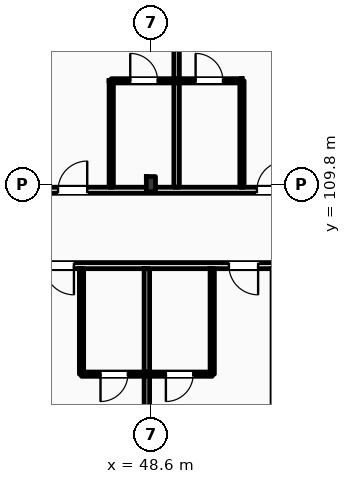
"""IFC4 building model, lengths in metres.
Left out: names, types, materials, properties, quantities, classifications, styles, units other than length and angle.
Written with IfcOpenShell. Run it as: python <this file> out.ifc"""

import sys

from ifc_helpers import new_model, si_unit, direction, frame, frame_2d, origin, origin_2d, place, context, subcontext, project, spatial, rectangle, i_section, extrude, element, fill, save


model = new_model("IFC4")
c1 = context("Model", 3, precision=1e-05, world=origin(), true_north=direction((0.0, 1.0)))
c2 = subcontext(c1, "Body", "Model", "MODEL_VIEW")
j1 = project(units=[si_unit("LENGTHUNIT", "METRE"), si_unit("PLANEANGLEUNIT", "RADIAN")], contexts=[c1])
p1 = place(None, origin())
s1 = spatial("IfcSite", under=j1, at=p1, CompositionType="ELEMENT")
p2 = place(p1, origin())
s2 = spatial("IfcBuilding", under=s1, at=p2, CompositionType="ELEMENT")
p3 = place(p2, frame((0.0, 0.0, 28.2)))
s3 = spatial("IfcBuildingStorey", under=s2, at=p3, CompositionType="ELEMENT", Elevation=28.2)
p4 = place(p3, frame((48.6, 109.8, 0.0), z_axis=(0.0, 0.0, 1.0), x_axis=(1.0, 0.0, 0.0)))
e1 = element("IfcColumn", 1, at=p4, inside=s3, PredefinedType="COLUMN", context=c2, shape_type="SweptSolid", body=[
    extrude(i_section(OverallWidth=0.3, OverallDepth=0.5, WebThickness=0.014, FlangeThickness=0.028, FilletRadius=0.027, at=origin_2d()), origin(), (0.0, 0.0, 1.0), 3.6),
])
p5 = place(p3, frame((10.65, 109.6, 0.0), z_axis=(0.0, 0.0, 1.0), x_axis=(1.0, 0.0, 0.0)))
e2 = element("IfcWall", 2, at=p5, inside=s3, PredefinedType="PARTITIONING", context=c2, shape_type="SweptSolid", body=[
    extrude(rectangle(XDim=109.21, YDim=0.2, at=frame_2d((54.605, 0.0))), origin(), (0.0, 0.0, 1.0), 2.8),
])
p6 = place(p5, frame((12.611, 0.0, 0.0)))
e3 = element("IfcOpeningElement", 3, at=p6, cuts=e2, PredefinedType="OPENING", context=c2, shape_type="SweptSolid", body=[
    extrude(rectangle(XDim=1.02, YDim=2.2, at=frame_2d((0.51, 1.1))), frame((0.0, 0.11, 0.0), z_axis=(0.0, -1.0, 0.0), x_axis=(1.0, 0.0, 0.0)), (0.0, 0.0, 1.0), 0.22),
])
p7 = place(p5, frame((19.451, 0.0, 0.0)))
e4 = element("IfcOpeningElement", 4, at=p7, cuts=e2, PredefinedType="OPENING", context=c2, shape_type="SweptSolid", body=[
    extrude(rectangle(XDim=1.02, YDim=2.2, at=frame_2d((0.51, 1.1))), frame((0.0, 0.11, 0.0), z_axis=(0.0, -1.0, 0.0), x_axis=(1.0, 0.0, 0.0)), (0.0, 0.0, 1.0), 0.22),
])
p8 = place(p5, frame((23.842, 0.0, 0.0)))
e5 = element("IfcOpeningElement", 5, at=p8, cuts=e2, PredefinedType="OPENING", context=c2, shape_type="SweptSolid", body=[
    extrude(rectangle(XDim=1.02, YDim=2.2, at=frame_2d((0.51, 1.1))), frame((0.0, 0.11, 0.0), z_axis=(0.0, -1.0, 0.0), x_axis=(1.0, 0.0, 0.0)), (0.0, 0.0, 1.0), 0.22),
])
p9 = place(p5, frame((26.084, 0.0, 0.0)))
e6 = element("IfcOpeningElement", 6, at=p9, cuts=e2, PredefinedType="OPENING", context=c2, shape_type="SweptSolid", body=[
    extrude(rectangle(XDim=1.02, YDim=2.2, at=frame_2d((0.51, 1.1))), frame((0.0, 0.11, 0.0), z_axis=(0.0, -1.0, 0.0), x_axis=(1.0, 0.0, 0.0)), (0.0, 0.0, 1.0), 0.22),
])
p10 = place(p5, frame((32.655, 0.0, 0.0)))
e7 = element("IfcOpeningElement", 7, at=p10, cuts=e2, PredefinedType="OPENING", context=c2, shape_type="SweptSolid", body=[
    extrude(rectangle(XDim=0.96, YDim=2.2, at=frame_2d((0.48, 1.1))), frame((0.0, 0.11, 0.0), z_axis=(0.0, -1.0, 0.0), x_axis=(1.0, 0.0, 0.0)), (0.0, 0.0, 1.0), 0.22),
])
p11 = place(p5, frame((34.895, 0.0, 0.0)))
e8 = element("IfcOpeningElement", 8, at=p11, cuts=e2, PredefinedType="OPENING", context=c2, shape_type="SweptSolid", body=[
    extrude(rectangle(XDim=0.96, YDim=2.2, at=frame_2d((0.48, 1.1))), frame((0.0, 0.11, 0.0), z_axis=(0.0, -1.0, 0.0), x_axis=(1.0, 0.0, 0.0)), (0.0, 0.0, 1.0), 0.22),
])
p12 = place(p5, frame((41.436, 0.0, 0.0)))
e9 = element("IfcOpeningElement", 9, at=p12, cuts=e2, PredefinedType="OPENING", context=c2, shape_type="SweptSolid", body=[
    extrude(rectangle(XDim=0.96, YDim=2.2, at=frame_2d((0.48, 1.1))), frame((0.0, 0.11, 0.0), z_axis=(0.0, -1.0, 0.0), x_axis=(1.0, 0.0, 0.0)), (0.0, 0.0, 1.0), 0.22),
])
p13 = place(p5, frame((43.427, 0.0, 0.0)))
e10 = element("IfcOpeningElement", 10, at=p13, cuts=e2, PredefinedType="OPENING", context=c2, shape_type="SweptSolid", body=[
    extrude(rectangle(XDim=0.96, YDim=2.2, at=frame_2d((0.48, 1.1))), frame((0.0, 0.11, 0.0), z_axis=(0.0, -1.0, 0.0), x_axis=(1.0, 0.0, 0.0)), (0.0, 0.0, 1.0), 0.22),
])
p14 = place(p5, frame((50.218, 0.0, 0.0)))
e11 = element("IfcOpeningElement", 11, at=p14, cuts=e2, PredefinedType="OPENING", context=c2, shape_type="SweptSolid", body=[
    extrude(rectangle(XDim=0.96, YDim=2.2, at=frame_2d((0.48, 1.1))), frame((0.0, 0.11, 0.0), z_axis=(0.0, -1.0, 0.0), x_axis=(1.0, 0.0, 0.0)), (0.0, 0.0, 1.0), 0.22),
])
p15 = place(p5, frame((54.859, 0.0, 0.0)))
e12 = element("IfcOpeningElement", 12, at=p15, cuts=e2, PredefinedType="OPENING", context=c2, shape_type="SweptSolid", body=[
    extrude(rectangle(XDim=0.96, YDim=2.2, at=frame_2d((0.48, 1.1))), frame((0.0, 0.11, 0.0), z_axis=(0.0, -1.0, 0.0), x_axis=(1.0, 0.0, 0.0)), (0.0, 0.0, 1.0), 0.22),
])
p16 = place(p5, frame((59.0, 0.0, 0.0)))
e13 = element("IfcOpeningElement", 13, at=p16, cuts=e2, PredefinedType="OPENING", context=c2, shape_type="SweptSolid", body=[
    extrude(rectangle(XDim=0.96, YDim=2.2, at=frame_2d((0.48, 1.1))), frame((0.0, 0.11, 0.0), z_axis=(0.0, -1.0, 0.0), x_axis=(1.0, 0.0, 0.0)), (0.0, 0.0, 1.0), 0.22),
])
p17 = place(p5, frame((63.39, 0.0, 0.0)))
e14 = element("IfcOpeningElement", 14, at=p17, cuts=e2, PredefinedType="OPENING", context=c2, shape_type="SweptSolid", body=[
    extrude(rectangle(XDim=0.96, YDim=2.2, at=frame_2d((0.48, 1.1))), frame((0.0, 0.11, 0.0), z_axis=(0.0, -1.0, 0.0), x_axis=(1.0, 0.0, 0.0)), (0.0, 0.0, 1.0), 0.22),
])
p18 = place(p5, frame((65.631, 0.0, 0.0)))
e15 = element("IfcOpeningElement", 15, at=p18, cuts=e2, PredefinedType="OPENING", context=c2, shape_type="SweptSolid", body=[
    extrude(rectangle(XDim=0.96, YDim=2.2, at=frame_2d((0.48, 1.1))), frame((0.0, 0.11, 0.0), z_axis=(0.0, -1.0, 0.0), x_axis=(1.0, 0.0, 0.0)), (0.0, 0.0, 1.0), 0.22),
])
p19 = place(p5, frame((72.172, 0.0, 0.0)))
e16 = element("IfcOpeningElement", 16, at=p19, cuts=e2, PredefinedType="OPENING", context=c2, shape_type="SweptSolid", body=[
    extrude(rectangle(XDim=0.96, YDim=2.2, at=frame_2d((0.48, 1.1))), frame((0.0, 0.11, 0.0), z_axis=(0.0, -1.0, 0.0), x_axis=(1.0, 0.0, 0.0)), (0.0, 0.0, 1.0), 0.22),
])
p20 = place(p5, frame((74.413, 0.0, 0.0)))
e17 = element("IfcOpeningElement", 17, at=p20, cuts=e2, PredefinedType="OPENING", context=c2, shape_type="SweptSolid", body=[
    extrude(rectangle(XDim=0.96, YDim=2.2, at=frame_2d((0.48, 1.1))), frame((0.0, 0.11, 0.0), z_axis=(0.0, -1.0, 0.0), x_axis=(1.0, 0.0, 0.0)), (0.0, 0.0, 1.0), 0.22),
])
p21 = place(p5, frame((80.954, 0.0, 0.0)))
e18 = element("IfcOpeningElement", 18, at=p21, cuts=e2, PredefinedType="OPENING", context=c2, shape_type="SweptSolid", body=[
    extrude(rectangle(XDim=0.96, YDim=2.2, at=frame_2d((0.48, 1.1))), frame((0.0, 0.11, 0.0), z_axis=(0.0, -1.0, 0.0), x_axis=(1.0, 0.0, 0.0)), (0.0, 0.0, 1.0), 0.22),
])
p22 = place(p5, frame((83.195, 0.0, 0.0)))
e19 = element("IfcOpeningElement", 19, at=p22, cuts=e2, PredefinedType="OPENING", context=c2, shape_type="SweptSolid", body=[
    extrude(rectangle(XDim=0.96, YDim=2.2, at=frame_2d((0.48, 1.1))), frame((0.0, 0.11, 0.0), z_axis=(0.0, -1.0, 0.0), x_axis=(1.0, 0.0, 0.0)), (0.0, 0.0, 1.0), 0.22),
])
p23 = place(p5, frame((89.735, 0.0, 0.0)))
e20 = element("IfcOpeningElement", 20, at=p23, cuts=e2, PredefinedType="OPENING", context=c2, shape_type="SweptSolid", body=[
    extrude(rectangle(XDim=0.96, YDim=2.2, at=frame_2d((0.48, 1.1))), frame((0.0, 0.11, 0.0), z_axis=(0.0, -1.0, 0.0), x_axis=(1.0, 0.0, 0.0)), (0.0, 0.0, 1.0), 0.22),
])
p24 = place(p5, frame((94.126, 0.0, 0.0)))
e21 = element("IfcOpeningElement", 21, at=p24, cuts=e2, PredefinedType="OPENING", context=c2, shape_type="SweptSolid", body=[
    extrude(rectangle(XDim=0.96, YDim=2.2, at=frame_2d((0.48, 1.1))), frame((0.0, 0.11, 0.0), z_axis=(0.0, -1.0, 0.0), x_axis=(1.0, 0.0, 0.0)), (0.0, 0.0, 1.0), 0.22),
])
p25 = place(p5, frame((98.517, 0.0, 0.0)))
e22 = element("IfcOpeningElement", 22, at=p25, cuts=e2, PredefinedType="OPENING", context=c2, shape_type="SweptSolid", body=[
    extrude(rectangle(XDim=0.96, YDim=2.2, at=frame_2d((0.48, 1.1))), frame((0.0, 0.11, 0.0), z_axis=(0.0, -1.0, 0.0), x_axis=(1.0, 0.0, 0.0)), (0.0, 0.0, 1.0), 0.22),
])
p26 = place(p5, frame((102.908, 0.0, 0.0)))
e23 = element("IfcOpeningElement", 23, at=p26, cuts=e2, PredefinedType="OPENING", context=c2, shape_type="SweptSolid", body=[
    extrude(rectangle(XDim=0.96, YDim=2.2, at=frame_2d((0.48, 1.1))), frame((0.0, 0.11, 0.0), z_axis=(0.0, -1.0, 0.0), x_axis=(1.0, 0.0, 0.0)), (0.0, 0.0, 1.0), 0.22),
])
p27 = place(p5, frame((105.099, 0.0, 0.0)))
e24 = element("IfcOpeningElement", 24, at=p27, cuts=e2, PredefinedType="OPENING", context=c2, shape_type="SweptSolid", body=[
    extrude(rectangle(XDim=0.96, YDim=2.2, at=frame_2d((0.48, 1.1))), frame((0.0, 0.11, 0.0), z_axis=(0.0, -1.0, 0.0), x_axis=(1.0, 0.0, 0.0)), (0.0, 0.0, 1.0), 0.22),
])
p28 = place(p5, frame((2.716, 0.0, 0.0)))
e25 = element("IfcOpeningElement", 25, at=p28, cuts=e2, PredefinedType="OPENING", context=c2, shape_type="SweptSolid", body=[
    extrude(rectangle(XDim=1.35, YDim=2.25, at=frame_2d((0.675, 1.125))), frame((0.0, 0.11, 0.0), z_axis=(0.0, -1.0, 0.0), x_axis=(1.0, 0.0, 0.0)), (0.0, 0.0, 1.0), 0.22),
])
p29 = place(p5, frame((6.65, 0.0, 0.0)))
e26 = element("IfcOpeningElement", 26, at=p29, cuts=e2, PredefinedType="OPENING", context=c2, shape_type="SweptSolid", body=[
    extrude(rectangle(XDim=1.35, YDim=2.25, at=frame_2d((0.675, 1.125))), frame((0.0, 0.11, 0.0), z_axis=(0.0, -1.0, 0.0), x_axis=(1.0, 0.0, 0.0)), (0.0, 0.0, 1.0), 0.22),
])
p30 = place(p5, frame((10.583, 0.0, 0.0)))
e27 = element("IfcOpeningElement", 27, at=p30, cuts=e2, PredefinedType="OPENING", context=c2, shape_type="SweptSolid", body=[
    extrude(rectangle(XDim=1.35, YDim=2.25, at=frame_2d((0.675, 1.125))), frame((0.0, 0.11, 0.0), z_axis=(0.0, -1.0, 0.0), x_axis=(1.0, 0.0, 0.0)), (0.0, 0.0, 1.0), 0.22),
])
p31 = place(p3, frame((40.76, 107.12, 0.0), z_axis=(0.0, 0.0, 1.0), x_axis=(1.0, 0.0, 0.0)))
e28 = element("IfcWall", 28, at=p31, inside=s3, PredefinedType="PARTITIONING", context=c2, shape_type="SweptSolid", body=[
    extrude(rectangle(XDim=23.44, YDim=0.2, at=frame_2d((11.72, 0.0))), origin(), (0.0, 0.0, 1.0), 3.36),
])
p32 = place(p31, frame((2.639, 0.0, 0.0)))
e29 = element("IfcOpeningElement", 29, at=p32, cuts=e28, PredefinedType="OPENING", context=c2, shape_type="SweptSolid", body=[
    extrude(rectangle(XDim=0.96, YDim=2.2, at=frame_2d((0.48, 1.1))), frame((0.0, 0.11, 0.0), z_axis=(0.0, -1.0, 0.0), x_axis=(1.0, 0.0, 0.0)), (0.0, 0.0, 1.0), 0.22),
])
p33 = place(p31, frame((4.348, 0.0, 0.0)))
e30 = element("IfcOpeningElement", 30, at=p33, cuts=e28, PredefinedType="OPENING", context=c2, shape_type="SweptSolid", body=[
    extrude(rectangle(XDim=0.96, YDim=2.2, at=frame_2d((0.48, 1.1))), frame((0.0, 0.11, 0.0), z_axis=(0.0, -1.0, 0.0), x_axis=(1.0, 0.0, 0.0)), (0.0, 0.0, 1.0), 0.22),
])
p34 = place(p31, frame((10.406, 0.0, 0.0)))
e31 = element("IfcOpeningElement", 31, at=p34, cuts=e28, PredefinedType="OPENING", context=c2, shape_type="SweptSolid", body=[
    extrude(rectangle(XDim=0.96, YDim=2.2, at=frame_2d((0.48, 1.1))), frame((0.0, 0.11, 0.0), z_axis=(0.0, -1.0, 0.0), x_axis=(1.0, 0.0, 0.0)), (0.0, 0.0, 1.0), 0.22),
])
p35 = place(p31, frame((12.164, 0.0, 0.0)))
e32 = element("IfcOpeningElement", 32, at=p35, cuts=e28, PredefinedType="OPENING", context=c2, shape_type="SweptSolid", body=[
    extrude(rectangle(XDim=0.96, YDim=2.2, at=frame_2d((0.48, 1.1))), frame((0.0, 0.11, 0.0), z_axis=(0.0, -1.0, 0.0), x_axis=(1.0, 0.0, 0.0)), (0.0, 0.0, 1.0), 0.22),
])
p36 = place(p31, frame((18.223, 0.0, 0.0)))
e33 = element("IfcOpeningElement", 33, at=p36, cuts=e28, PredefinedType="OPENING", context=c2, shape_type="SweptSolid", body=[
    extrude(rectangle(XDim=0.96, YDim=2.2, at=frame_2d((0.48, 1.1))), frame((0.0, 0.11, 0.0), z_axis=(0.0, -1.0, 0.0), x_axis=(1.0, 0.0, 0.0)), (0.0, 0.0, 1.0), 0.22),
])
p37 = place(p31, frame((20.031, 0.0, 0.0)))
e34 = element("IfcOpeningElement", 34, at=p37, cuts=e28, PredefinedType="OPENING", context=c2, shape_type="SweptSolid", body=[
    extrude(rectangle(XDim=0.96, YDim=2.2, at=frame_2d((0.48, 1.1))), frame((0.0, 0.11, 0.0), z_axis=(0.0, -1.0, 0.0), x_axis=(1.0, 0.0, 0.0)), (0.0, 0.0, 1.0), 0.22),
])
p38 = place(p3, frame((49.445, 109.7, 0.0), z_axis=(0.0, 0.0, 1.0), x_axis=(0.0, 1.0, 0.0)))
e35 = element("IfcWall", 35, at=p38, inside=s3, PredefinedType="PARTITIONING", context=c2, shape_type="SweptSolid", body=[
    extrude(rectangle(XDim=8.15, YDim=0.18, at=frame_2d((4.075, 0.0))), origin(), (0.0, 0.0, 1.0), 3.36),
])
p39 = place(p3, frame((47.295, 109.7, 0.0), z_axis=(0.0, 0.0, 1.0), x_axis=(0.0, 1.0, 0.0)))
e36 = element("IfcWall", 36, at=p39, inside=s3, PredefinedType="PARTITIONING", context=c2, shape_type="SweptSolid", body=[
    extrude(rectangle(XDim=3.5, YDim=0.14, at=frame_2d((1.75, 0.0))), origin(), (0.0, 0.0, 1.0), 3.36),
])
p40 = place(p3, frame((47.295, 113.2, 0.0), z_axis=(0.0, 0.0, 1.0), x_axis=(1.0, 0.0, 0.0)))
e37 = element("IfcWall", 37, at=p40, inside=s3, PredefinedType="PARTITIONING", context=c2, shape_type="SweptSolid", body=[
    extrude(rectangle(XDim=2.15, YDim=0.14, at=frame_2d((1.075, 0.0))), origin(), (0.0, 0.0, 1.0), 3.36),
])
p41 = place(p40, frame((0.625, 0.0, 0.0)))
e38 = element("IfcOpeningElement", 38, at=p41, cuts=e37, PredefinedType="OPENING", context=c2, shape_type="SweptSolid", body=[
    extrude(rectangle(XDim=0.9, YDim=2.1, at=frame_2d((0.45, 1.05))), frame((0.0, 0.08, 0.0), z_axis=(0.0, -1.0, 0.0), x_axis=(1.0, 0.0, 0.0)), (0.0, 0.0, 1.0), 0.16),
])
p42 = place(p3, frame((51.595, 109.7, 0.0), z_axis=(0.0, 0.0, 1.0), x_axis=(0.0, 1.0, 0.0)))
e39 = element("IfcWall", 39, at=p42, inside=s3, PredefinedType="PARTITIONING", context=c2, shape_type="SweptSolid", body=[
    extrude(rectangle(XDim=3.5, YDim=0.14, at=frame_2d((1.75, 0.0))), origin(), (0.0, 0.0, 1.0), 3.36),
])
p43 = place(p3, frame((49.445, 113.2, 0.0), z_axis=(0.0, 0.0, 1.0), x_axis=(1.0, 0.0, 0.0)))
e40 = element("IfcWall", 40, at=p43, inside=s3, PredefinedType="PARTITIONING", context=c2, shape_type="SweptSolid", body=[
    extrude(rectangle(XDim=2.15, YDim=0.14, at=frame_2d((1.075, 0.0))), origin(), (0.0, 0.0, 1.0), 3.36),
])
p44 = place(p43, frame((0.625, 0.0, 0.0)))
e41 = element("IfcOpeningElement", 41, at=p44, cuts=e40, PredefinedType="OPENING", context=c2, shape_type="SweptSolid", body=[
    extrude(rectangle(XDim=0.9, YDim=2.1, at=frame_2d((0.45, 1.05))), frame((0.0, 0.08, 0.0), z_axis=(0.0, -1.0, 0.0), x_axis=(1.0, 0.0, 0.0)), (0.0, 0.0, 1.0), 0.16),
])
p45 = place(p3, frame((48.467, 96.14, 0.0), z_axis=(0.0, 0.0, 1.0), x_axis=(0.0, 1.0, 0.0)))
e42 = element("IfcWall", 42, at=p45, inside=s3, PredefinedType="PARTITIONING", context=c2, shape_type="SweptSolid", body=[
    extrude(rectangle(XDim=10.88, YDim=0.18, at=frame_2d((5.44, 0.0))), origin(), (0.0, 0.0, 1.0), 2.99),
])
p46 = place(p3, frame((46.317, 103.55, 0.0), z_axis=(0.0, 0.0, 1.0), x_axis=(0.0, 1.0, 0.0)))
e43 = element("IfcWall", 43, at=p46, inside=s3, PredefinedType="PARTITIONING", context=c2, shape_type="SweptSolid", body=[
    extrude(rectangle(XDim=3.47, YDim=0.14, at=frame_2d((1.735, 0.0))), origin(), (0.0, 0.0, 1.0), 3.36),
])
p47 = place(p3, frame((46.317, 103.55, 0.0), z_axis=(0.0, 0.0, 1.0), x_axis=(1.0, 0.0, 0.0)))
e44 = element("IfcWall", 44, at=p47, inside=s3, PredefinedType="PARTITIONING", context=c2, shape_type="SweptSolid", body=[
    extrude(rectangle(XDim=2.15, YDim=0.14, at=frame_2d((1.075, 0.0))), origin(), (0.0, 0.0, 1.0), 3.36),
])
p48 = place(p47, frame((0.625, 0.0, 0.0)))
e45 = element("IfcOpeningElement", 45, at=p48, cuts=e44, PredefinedType="OPENING", context=c2, shape_type="SweptSolid", body=[
    extrude(rectangle(XDim=0.9, YDim=2.1, at=frame_2d((0.45, 1.05))), frame((0.0, 0.08, 0.0), z_axis=(0.0, -1.0, 0.0), x_axis=(1.0, 0.0, 0.0)), (0.0, 0.0, 1.0), 0.16),
])
p49 = place(p3, frame((50.617, 103.55, 0.0), z_axis=(0.0, 0.0, 1.0), x_axis=(0.0, 1.0, 0.0)))
e46 = element("IfcWall", 46, at=p49, inside=s3, PredefinedType="PARTITIONING", context=c2, shape_type="SweptSolid", body=[
    extrude(rectangle(XDim=3.47, YDim=0.14, at=frame_2d((1.735, 0.0))), origin(), (0.0, 0.0, 1.0), 3.36),
])
p50 = place(p3, frame((48.467, 103.55, 0.0), z_axis=(0.0, 0.0, 1.0), x_axis=(1.0, 0.0, 0.0)))
e47 = element("IfcWall", 47, at=p50, inside=s3, PredefinedType="PARTITIONING", context=c2, shape_type="SweptSolid", body=[
    extrude(rectangle(XDim=2.15, YDim=0.14, at=frame_2d((1.075, 0.0))), origin(), (0.0, 0.0, 1.0), 3.36),
])
p51 = place(p50, frame((0.625, 0.0, 0.0)))
e48 = element("IfcOpeningElement", 48, at=p51, cuts=e47, PredefinedType="OPENING", context=c2, shape_type="SweptSolid", body=[
    extrude(rectangle(XDim=0.9, YDim=2.1, at=frame_2d((0.45, 1.05))), frame((0.0, 0.08, 0.0), z_axis=(0.0, -1.0, 0.0), x_axis=(1.0, 0.0, 0.0)), (0.0, 0.0, 1.0), 0.16),
])
p52 = place(p11, origin())
e49 = element("IfcDoor", 49, at=p52, inside=s3, OperationType="SINGLE_SWING_RIGHT", PredefinedType="DOOR", context=c2, shape_type="SweptSolid", body=[
    extrude(rectangle(XDim=0.96, YDim=2.2, at=frame_2d((0.48, 1.1))), frame((0.0, 0.025, 0.0), z_axis=(0.0, -1.0, 0.0), x_axis=(1.0, 0.0, 0.0)), (0.0, 0.0, 1.0), 0.05),
])
fill(e8, e49)
p53 = place(p41, origin())
e50 = element("IfcDoor", 50, at=p53, inside=s3, OperationType="SINGLE_SWING_LEFT", PredefinedType="DOOR", context=c2, shape_type="SweptSolid", body=[
    extrude(rectangle(XDim=0.9, YDim=2.1, at=frame_2d((0.45, 1.05))), frame((0.0, 0.025, 0.0), z_axis=(0.0, -1.0, 0.0), x_axis=(1.0, 0.0, 0.0)), (0.0, 0.0, 1.0), 0.05),
])
fill(e38, e50)
p54 = place(p12, origin())
e51 = element("IfcDoor", 51, at=p54, inside=s3, OperationType="SINGLE_SWING_RIGHT", PredefinedType="DOOR", context=c2, shape_type="SweptSolid", body=[
    extrude(rectangle(XDim=0.96, YDim=2.2, at=frame_2d((0.48, 1.1))), frame((0.0, 0.025, 0.0), z_axis=(0.0, -1.0, 0.0), x_axis=(1.0, 0.0, 0.0)), (0.0, 0.0, 1.0), 0.05),
])
fill(e9, e51)
p55 = place(p44, origin())
e52 = element("IfcDoor", 52, at=p55, inside=s3, OperationType="SINGLE_SWING_LEFT", PredefinedType="DOOR", context=c2, shape_type="SweptSolid", body=[
    extrude(rectangle(XDim=0.9, YDim=2.1, at=frame_2d((0.45, 1.05))), frame((0.0, 0.025, 0.0), z_axis=(0.0, -1.0, 0.0), x_axis=(1.0, 0.0, 0.0)), (0.0, 0.0, 1.0), 0.05),
])
fill(e41, e52)
p56 = place(p33, frame((0.96, 0.0, 0.0), z_axis=(0.0, 0.0, 1.0), x_axis=(-1.0, 0.0, 0.0)))
e53 = element("IfcDoor", 53, at=p56, inside=s3, OperationType="SINGLE_SWING_RIGHT", PredefinedType="DOOR", context=c2, shape_type="SweptSolid", body=[
    extrude(rectangle(XDim=0.96, YDim=2.2, at=frame_2d((0.48, 1.1))), frame((0.0, 0.025, 0.0), z_axis=(0.0, -1.0, 0.0), x_axis=(1.0, 0.0, 0.0)), (0.0, 0.0, 1.0), 0.05),
])
fill(e30, e53)
p57 = place(p48, frame((0.9, 0.0, 0.0), z_axis=(0.0, 0.0, 1.0), x_axis=(-1.0, 0.0, 0.0)))
e54 = element("IfcDoor", 54, at=p57, inside=s3, OperationType="SINGLE_SWING_LEFT", PredefinedType="DOOR", context=c2, shape_type="SweptSolid", body=[
    extrude(rectangle(XDim=0.9, YDim=2.1, at=frame_2d((0.45, 1.05))), frame((0.0, 0.025, 0.0), z_axis=(0.0, -1.0, 0.0), x_axis=(1.0, 0.0, 0.0)), (0.0, 0.0, 1.0), 0.05),
])
fill(e45, e54)
p58 = place(p34, frame((0.96, 0.0, 0.0), z_axis=(0.0, 0.0, 1.0), x_axis=(-1.0, 0.0, 0.0)))
e55 = element("IfcDoor", 55, at=p58, inside=s3, OperationType="SINGLE_SWING_RIGHT", PredefinedType="DOOR", context=c2, shape_type="SweptSolid", body=[
    extrude(rectangle(XDim=0.96, YDim=2.2, at=frame_2d((0.48, 1.1))), frame((0.0, 0.025, 0.0), z_axis=(0.0, -1.0, 0.0), x_axis=(1.0, 0.0, 0.0)), (0.0, 0.0, 1.0), 0.05),
])
fill(e31, e55)
p59 = place(p51, frame((0.9, 0.0, 0.0), z_axis=(0.0, 0.0, 1.0), x_axis=(-1.0, 0.0, 0.0)))
e56 = element("IfcDoor", 56, at=p59, inside=s3, OperationType="SINGLE_SWING_LEFT", PredefinedType="DOOR", context=c2, shape_type="SweptSolid", body=[
    extrude(rectangle(XDim=0.9, YDim=2.1, at=frame_2d((0.45, 1.05))), frame((0.0, 0.025, 0.0), z_axis=(0.0, -1.0, 0.0), x_axis=(1.0, 0.0, 0.0)), (0.0, 0.0, 1.0), 0.05),
])
fill(e48, e56)
save(model, sys.argv[1])
